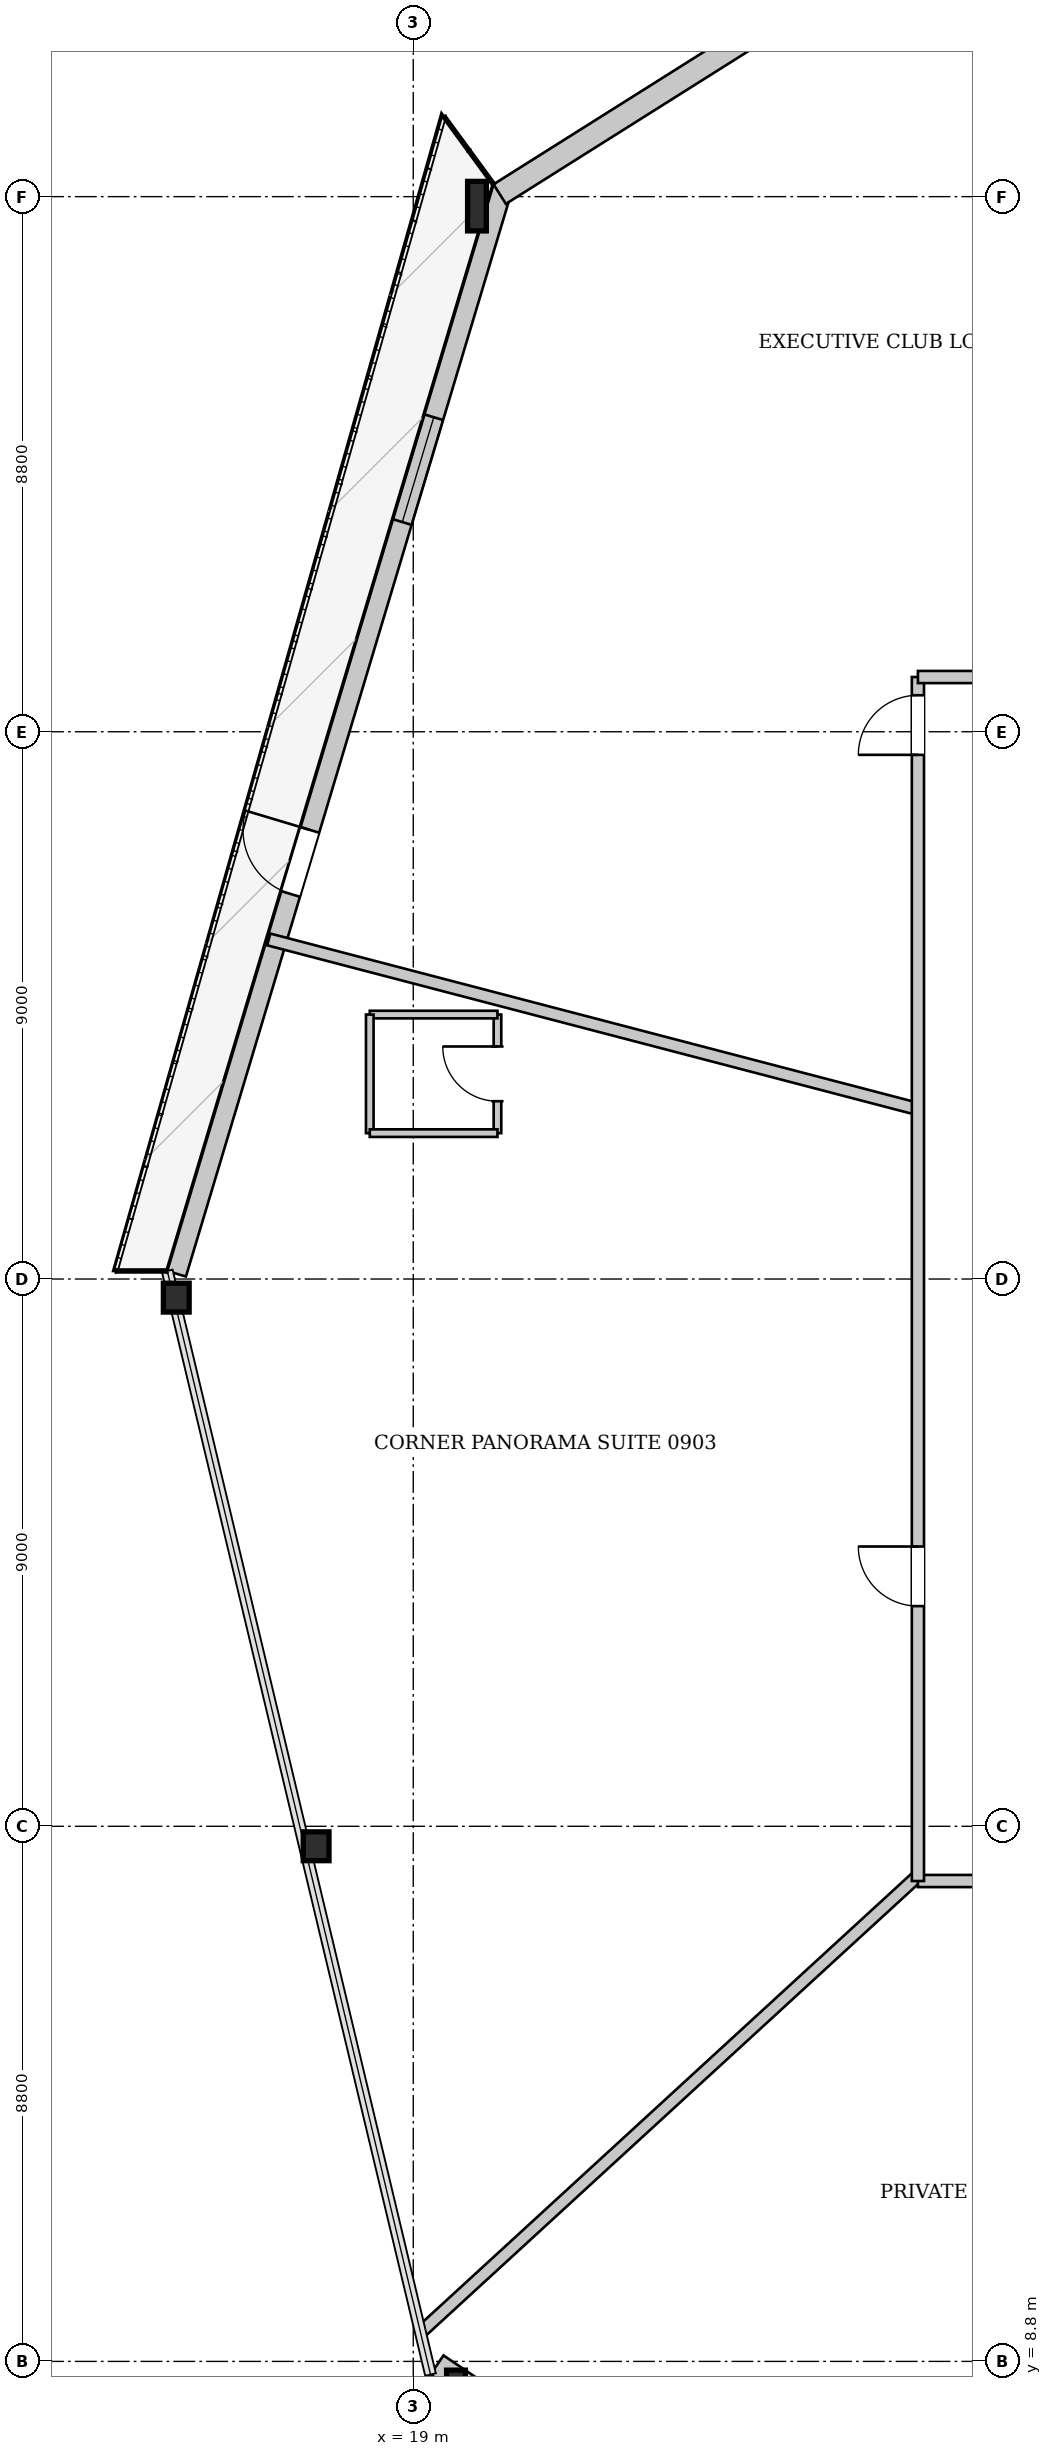
"""IFC4 building model, lengths in metres.
Left out: names, types, materials, properties, quantities, classifications, styles, units other than length and angle.
Written with IfcOpenShell. Run it as: python <this file> out.ifc"""

import sys

from ifc_helpers import new_model, si_unit, direction, frame, frame_2d, origin, origin_2d, place, context, subcontext, project, spatial, rectangle, i_section, extrude, source, transform, mapped, element, fill, save


model = new_model("IFC4")
c1 = context("Model", 3, precision=1e-05, world=origin(), true_north=direction((0.0, 1.0)))
c2 = subcontext(c1, "Body", "Model", "MODEL_VIEW")
j1 = project(units=[si_unit("LENGTHUNIT", "METRE"), si_unit("PLANEANGLEUNIT", "RADIAN")], contexts=[c1])
p1 = place(None, origin())
s1 = spatial("IfcSite", under=j1, at=p1, CompositionType="ELEMENT")
p2 = place(p1, origin())
s2 = spatial("IfcBuilding", under=s1, at=p2, CompositionType="ELEMENT")
p3 = place(p2, frame((0.0, 0.0, 39.95)))
s3 = spatial("IfcBuildingStorey", under=s2, at=p3, CompositionType="ELEMENT", Elevation=39.95)
m1 = source(origin(), c2, "Body", "SweptSolid", [
    extrude(i_section(OverallWidth=0.308, OverallDepth=0.814, WebThickness=0.021, FlangeThickness=0.04, at=origin_2d()), origin(), (0.0, 0.0, 1.0), 3.503),
])
p4 = place(p3, frame((20.321, 44.603, 0.0), z_axis=(-0.155904547474, -0.204829443462, 0.966301542567), x_axis=(0.795723738554, -0.605659749284, 0.0)))
e1 = element("IfcColumn", 1, at=p4, inside=s3, PredefinedType="COLUMN", context=c2, shape_type="MappedRepresentation", body=[
    mapped(m1, transform((0.0, 0.0, 0.0), x_axis=(1.0, 0.0, 0.0), y_axis=(0.0, 1.0, 0.0), z_axis=(0.0, 0.0, 1.0), scale=1.0)),
])
m2 = source(origin(), c2, "Body", "SweptSolid", [
    extrude(i_section(OverallWidth=0.424, OverallDepth=0.474, WebThickness=0.043, FlangeThickness=0.068, at=origin_2d()), origin(), (0.0, 0.0, 1.0), 3.51),
])
p5 = place(p3, frame((14.955, 26.733, 0.0), z_axis=(0.084035743792, -0.250228949024, 0.96453277126), x_axis=(0.947969326335, 0.318361675344, 0.0)))
e2 = element("IfcColumn", 2, at=p5, inside=s3, PredefinedType="COLUMN", context=c2, shape_type="MappedRepresentation", body=[
    mapped(m2, transform((0.0, 0.0, 0.0), x_axis=(1.0, 0.0, 0.0), y_axis=(0.0, 1.0, 0.0), z_axis=(0.0, 0.0, 1.0), scale=1.0)),
])
m3 = source(origin(), c2, "Body", "SweptSolid", [
    extrude(i_section(OverallWidth=0.424, OverallDepth=0.474, WebThickness=0.043, FlangeThickness=0.068, at=origin_2d()), origin(), (0.0, 0.0, 1.0), 3.518),
])
p6 = place(p3, frame((17.12, 17.658, 0.0), z_axis=(0.160790662354, -0.219916102288, 0.962176320044), x_axis=(0.80724641401, 0.590214560196, 0.0)))
e3 = element("IfcColumn", 3, at=p6, inside=s3, PredefinedType="COLUMN", context=c2, shape_type="MappedRepresentation", body=[
    mapped(m3, transform((0.0, 0.0, 0.0), x_axis=(1.0, 0.0, 0.0), y_axis=(0.0, 1.0, 0.0), z_axis=(0.0, 0.0, 1.0), scale=1.0)),
])
m4 = source(origin(), c2, "Body", "SweptSolid", [
    extrude(i_section(OverallWidth=0.308, OverallDepth=0.814, WebThickness=0.021, FlangeThickness=0.04, at=origin_2d()), origin(), (0.0, 0.0, 1.0), 3.551),
])
p7 = place(p3, frame((19.284, 8.584, 0.0), z_axis=(0.235644751248, -0.188543305492, 0.953374518835), x_axis=(0.624750617891, 0.780824349931, 0.0)))
e4 = element("IfcColumn", 4, at=p7, inside=s3, PredefinedType="COLUMN", context=c2, shape_type="MappedRepresentation", body=[
    mapped(m4, transform((0.0, 0.0, 0.0), x_axis=(1.0, 0.0, 0.0), y_axis=(0.0, 1.0, 0.0), z_axis=(0.0, 0.0, 1.0), scale=1.0)),
])
p8 = place(p3, frame((48.65, 10.331, 0.0), z_axis=(0.0, 0.0, 1.0), x_axis=(-0.977755300127, -0.209748833307, 0.0)))
e5 = element("IfcWall", 5, at=p8, inside=s3, PredefinedType="SOLIDWALL", context=c2, shape_type="SweptSolid", body=[
    extrude(rectangle(XDim=24.659, YDim=0.32, at=frame_2d((12.329, 0.0))), origin(), (0.0, 0.0, 1.0), 2.592),
])
p9 = place(p8, frame((7.341, 0.0, 0.0)))
e6 = element("IfcOpeningElement", 6, at=p9, cuts=e5, PredefinedType="OPENING", context=c2, shape_type="SweptSolid", body=[
    extrude(rectangle(XDim=1.1, YDim=2.3, at=frame_2d((0.55, 1.15))), frame((0.0, 0.17, 0.0), z_axis=(0.0, -1.0, 0.0), x_axis=(1.0, 0.0, 0.0)), (0.0, 0.0, 1.0), 0.34),
])
p10 = place(p8, frame((17.347, 0.0, 0.272)))
e7 = element("IfcOpeningElement", 7, at=p10, cuts=e5, PredefinedType="OPENING", context=c2, shape_type="SweptSolid", body=[
    extrude(rectangle(XDim=1.8, YDim=2.2, at=frame_2d((0.9, 1.1))), frame((0.0, 0.17, 0.0), z_axis=(0.0, -1.0, 0.0), x_axis=(1.0, 0.0, 0.0)), (0.0, 0.0, 1.0), 0.34),
])
p11 = place(p3, frame((24.68, 5.16, 0.0), z_axis=(0.0, 0.0, 1.0), x_axis=(-0.828077807829, 0.560613185878, 0.0)))
e8 = element("IfcWall", 8, at=p11, inside=s3, PredefinedType="SOLIDWALL", context=c2, shape_type="SweptSolid", body=[
    extrude(rectangle(XDim=6.388, YDim=0.38, at=frame_2d((3.194, 0.0))), origin(), (0.0, 0.0, 1.0), 2.592),
])
p12 = place(p3, frame((15.108, 26.687, 0.0), z_axis=(0.0, 0.0, 1.0), x_axis=(0.287597573263, 0.957751343436, 0.0)))
e9 = element("IfcWall", 9, at=p12, inside=s3, PredefinedType="SOLIDWALL", context=c2, shape_type="SweptSolid", body=[
    extrude(rectangle(XDim=18.658, YDim=0.32, at=frame_2d((9.329, 0.0))), origin(), (0.0, 0.0, 1.0), 2.592),
])
p13 = place(p12, frame((6.521, 0.0, 0.0)))
e10 = element("IfcOpeningElement", 10, at=p13, cuts=e9, PredefinedType="OPENING", context=c2, shape_type="SweptSolid", body=[
    extrude(rectangle(XDim=1.1, YDim=2.3, at=frame_2d((0.55, 1.15))), frame((0.0, 0.17, 0.0), z_axis=(0.0, -1.0, 0.0), x_axis=(1.0, 0.0, 0.0)), (0.0, 0.0, 1.0), 0.34),
])
p14 = place(p12, frame((12.907, 0.0, 0.272)))
e11 = element("IfcOpeningElement", 11, at=p14, cuts=e9, PredefinedType="OPENING", context=c2, shape_type="SweptSolid", body=[
    extrude(rectangle(XDim=1.8, YDim=2.2, at=frame_2d((0.9, 1.1))), frame((0.0, 0.17, 0.0), z_axis=(0.0, -1.0, 0.0), x_axis=(1.0, 0.0, 0.0)), (0.0, 0.0, 1.0), 0.34),
])
p15 = place(p3, frame((20.422, 44.442, 0.0), z_axis=(0.0, 0.0, 1.0), x_axis=(0.846162743233, 0.532924583749, 0.0)))
e12 = element("IfcWall", 12, at=p15, inside=s3, PredefinedType="SOLIDWALL", context=c2, shape_type="SweptSolid", body=[
    extrude(rectangle(XDim=6.631, YDim=0.38, at=frame_2d((3.315, 0.0))), origin(), (0.0, 0.0, 1.0), 2.592),
])
p16 = place(p3, frame((27.3, 29.396, 0.0), z_axis=(0.0, 0.0, 1.0), x_axis=(-0.967532637316, 0.252746109227, 0.0)))
e13 = element("IfcWall", 13, at=p16, inside=s3, PredefinedType="PARTITIONING", context=c2, shape_type="SweptSolid", body=[
    extrude(rectangle(XDim=11.035, YDim=0.2, at=frame_2d((5.518, 0.0))), origin(), (0.0, 0.0, 1.0), 3.3),
])
p17 = place(p3, frame((27.3, 16.783, 0.0), z_axis=(0.0, 0.0, 1.0), x_axis=(-0.73685833928, -0.676047178703, 0.0)))
e14 = element("IfcWall", 14, at=p17, inside=s3, PredefinedType="PARTITIONING", context=c2, shape_type="SweptSolid", body=[
    extrude(rectangle(XDim=11.069, YDim=0.2, at=frame_2d((5.534, 0.0))), origin(), (0.0, 0.0, 1.0), 3.3),
])
p18 = place(p3, frame((20.385, 28.999, 0.0), z_axis=(0.0, 0.0, 1.0), x_axis=(0.0, 1.0, 0.0)))
e15 = element("IfcWall", 15, at=p18, inside=s3, PredefinedType="PARTITIONING", context=c2, shape_type="SweptSolid", body=[
    extrude(rectangle(XDim=1.95, YDim=0.125, at=frame_2d((0.975, 0.0))), origin(), (0.0, 0.0, 1.0), 3.3),
])
p19 = place(p18, frame((0.525, 0.0, 0.0)))
e16 = element("IfcOpeningElement", 16, at=p19, cuts=e15, PredefinedType="OPENING", context=c2, shape_type="SweptSolid", body=[
    extrude(rectangle(XDim=0.9, YDim=2.1, at=frame_2d((0.45, 1.05))), frame((0.0, 0.073, 0.0), z_axis=(0.0, -1.0, 0.0), x_axis=(1.0, 0.0, 0.0)), (0.0, 0.0, 1.0), 0.145),
])
p20 = place(p3, frame((20.385, 30.949, 0.0), z_axis=(0.0, 0.0, 1.0), x_axis=(-1.0, 0.0, 0.0)))
e17 = element("IfcWall", 17, at=p20, inside=s3, PredefinedType="PARTITIONING", context=c2, shape_type="SweptSolid", body=[
    extrude(rectangle(XDim=2.1, YDim=0.125, at=frame_2d((1.05, 0.0))), origin(), (0.0, 0.0, 1.0), 3.3),
])
p21 = place(p3, frame((18.285, 30.949, 0.0), z_axis=(0.0, 0.0, 1.0), x_axis=(0.0, -1.0, 0.0)))
e18 = element("IfcWall", 18, at=p21, inside=s3, PredefinedType="PARTITIONING", context=c2, shape_type="SweptSolid", body=[
    extrude(rectangle(XDim=1.95, YDim=0.125, at=frame_2d((0.975, 0.0))), origin(), (0.0, 0.0, 1.0), 3.3),
])
p22 = place(p3, frame((18.285, 28.999, 0.0), z_axis=(0.0, 0.0, 1.0), x_axis=(1.0, 0.0, 0.0)))
e19 = element("IfcWall", 19, at=p22, inside=s3, PredefinedType="PARTITIONING", context=c2, shape_type="SweptSolid", body=[
    extrude(rectangle(XDim=2.1, YDim=0.125, at=frame_2d((1.05, 0.0))), origin(), (0.0, 0.0, 1.0), 3.3),
])
p23 = place(p3, frame((27.3, 16.7, 0.0), z_axis=(0.0, 0.0, 1.0), x_axis=(1.0, 0.0, 0.0)))
e20 = element("IfcWall", 20, at=p23, inside=s3, PredefinedType="PARTITIONING", context=c2, shape_type="SweptSolid", body=[
    extrude(rectangle(XDim=21.4, YDim=0.2, at=frame_2d((10.7, 0.0))), origin(), (0.0, 0.0, 1.0), 3.3),
])
p24 = place(p23, frame((9.34, 0.0, 0.0)))
e21 = element("IfcOpeningElement", 21, at=p24, cuts=e20, PredefinedType="OPENING", context=c2, shape_type="SweptSolid", body=[
    extrude(rectangle(XDim=0.98, YDim=2.15, at=frame_2d((0.49, 1.075))), frame((0.0, 0.11, 0.0), z_axis=(0.0, -1.0, 0.0), x_axis=(1.0, 0.0, 0.0)), (0.0, 0.0, 1.0), 0.22),
])
p25 = place(p3, frame((27.3, 16.7, 0.0), z_axis=(0.0, 0.0, 1.0), x_axis=(0.0, 1.0, 0.0)))
e22 = element("IfcWall", 22, at=p25, inside=s3, PredefinedType="PARTITIONING", context=c2, shape_type="SweptSolid", body=[
    extrude(rectangle(XDim=19.8, YDim=0.2, at=frame_2d((9.9, 0.0))), origin(), (0.0, 0.0, 1.0), 3.3),
])
p26 = place(p25, frame((18.52, 0.0, 0.0)))
e23 = element("IfcOpeningElement", 23, at=p26, cuts=e22, PredefinedType="OPENING", context=c2, shape_type="SweptSolid", body=[
    extrude(rectangle(XDim=0.98, YDim=2.15, at=frame_2d((0.49, 1.075))), frame((0.0, 0.11, 0.0), z_axis=(0.0, -1.0, 0.0), x_axis=(1.0, 0.0, 0.0)), (0.0, 0.0, 1.0), 0.22),
])
p27 = place(p25, frame((4.521, 0.0, 0.0)))
e24 = element("IfcOpeningElement", 24, at=p27, cuts=e22, PredefinedType="OPENING", context=c2, shape_type="SweptSolid", body=[
    extrude(rectangle(XDim=0.98, YDim=2.15, at=frame_2d((0.49, 1.075))), frame((0.0, 0.11, 0.0), z_axis=(0.0, -1.0, 0.0), x_axis=(1.0, 0.0, 0.0)), (0.0, 0.0, 1.0), 0.22),
])
p28 = place(p3, frame((27.3, 36.5, 0.0), z_axis=(0.0, 0.0, 1.0), x_axis=(1.0, 0.0, 0.0)))
e25 = element("IfcWall", 25, at=p28, inside=s3, PredefinedType="PARTITIONING", context=c2, shape_type="SweptSolid", body=[
    extrude(rectangle(XDim=21.4, YDim=0.2, at=frame_2d((10.7, 0.0))), origin(), (0.0, 0.0, 1.0), 3.3),
])
p29 = place(p28, frame((20.12, 0.0, 0.0)))
e26 = element("IfcOpeningElement", 26, at=p29, cuts=e25, PredefinedType="OPENING", context=c2, shape_type="SweptSolid", body=[
    extrude(rectangle(XDim=0.98, YDim=2.15, at=frame_2d((0.49, 1.075))), frame((0.0, 0.11, 0.0), z_axis=(0.0, -1.0, 0.0), x_axis=(1.0, 0.0, 0.0)), (0.0, 0.0, 1.0), 0.22),
])
m5 = source(origin(), c2, "Body", "SweptSolid", [
    extrude(rectangle(XDim=1.1, YDim=2.3, at=frame_2d((0.55, 1.15))), frame((0.0, 0.025, 0.0), z_axis=(0.0, -1.0, 0.0), x_axis=(1.0, 0.0, 0.0)), (0.0, 0.0, 1.0), 0.05),
])
p30 = place(p13, origin())
e27 = element("IfcDoor", 27, at=p30, inside=s3, OperationType="SINGLE_SWING_RIGHT", PredefinedType="DOOR", context=c2, shape_type="MappedRepresentation", body=[
    mapped(m5, transform((0.0, 0.0, 0.0), x_axis=(1.0, 0.0, 0.0), y_axis=(0.0, 1.0, 0.0), z_axis=(0.0, 0.0, 1.0), scale=1.0)),
])
fill(e10, e27)
m6 = source(origin(), c2, "Body", "SweptSolid", [
    extrude(rectangle(XDim=1.8, YDim=2.2, at=frame_2d((0.9, 1.1))), frame((0.0, 0.03, 0.0), z_axis=(0.0, -1.0, 0.0), x_axis=(1.0, 0.0, 0.0)), (0.0, 0.0, 1.0), 0.06),
])
p31 = place(p14, origin())
e28 = element("IfcWindow", 28, at=p31, inside=s3, PartitioningType="SINGLE_PANEL", PredefinedType="WINDOW", context=c2, shape_type="MappedRepresentation", body=[
    mapped(m6, transform((0.0, 0.0, 0.0), x_axis=(1.0, 0.0, 0.0), y_axis=(0.0, 1.0, 0.0), z_axis=(0.0, 0.0, 1.0), scale=1.0)),
])
fill(e11, e28)
m7 = source(origin(), c2, "Body", "SweptSolid", [
    extrude(rectangle(XDim=0.9, YDim=2.1, at=frame_2d((0.45, 1.05))), frame((0.0, 0.025, 0.0), z_axis=(0.0, -1.0, 0.0), x_axis=(1.0, 0.0, 0.0)), (0.0, 0.0, 1.0), 0.05),
])
p32 = place(p19, origin())
e29 = element("IfcDoor", 29, at=p32, inside=s3, OperationType="SINGLE_SWING_RIGHT", PredefinedType="DOOR", context=c2, shape_type="MappedRepresentation", body=[
    mapped(m7, transform((0.0, 0.0, 0.0), x_axis=(1.0, 0.0, 0.0), y_axis=(0.0, 1.0, 0.0), z_axis=(0.0, 0.0, 1.0), scale=1.0)),
])
fill(e16, e29)
m8 = source(origin(), c2, "Body", "SweptSolid", [
    extrude(rectangle(XDim=0.98, YDim=2.15, at=frame_2d((0.49, 1.075))), frame((0.0, 0.025, 0.0), z_axis=(0.0, -1.0, 0.0), x_axis=(1.0, 0.0, 0.0)), (0.0, 0.0, 1.0), 0.05),
])
p33 = place(p26, origin())
e30 = element("IfcDoor", 30, at=p33, inside=s3, OperationType="SINGLE_SWING_LEFT", PredefinedType="DOOR", context=c2, shape_type="MappedRepresentation", body=[
    mapped(m8, transform((0.0, 0.0, 0.0), x_axis=(1.0, 0.0, 0.0), y_axis=(0.0, 1.0, 0.0), z_axis=(0.0, 0.0, 1.0), scale=1.0)),
])
fill(e23, e30)
p34 = place(p27, origin())
e31 = element("IfcDoor", 31, at=p34, inside=s3, OperationType="SINGLE_SWING_RIGHT", PredefinedType="DOOR", context=c2, shape_type="MappedRepresentation", body=[
    mapped(m8, transform((0.0, 0.0, 0.0), x_axis=(1.0, 0.0, 0.0), y_axis=(0.0, 1.0, 0.0), z_axis=(0.0, 0.0, 1.0), scale=1.0)),
])
fill(e24, e31)
save(model, sys.argv[1])
